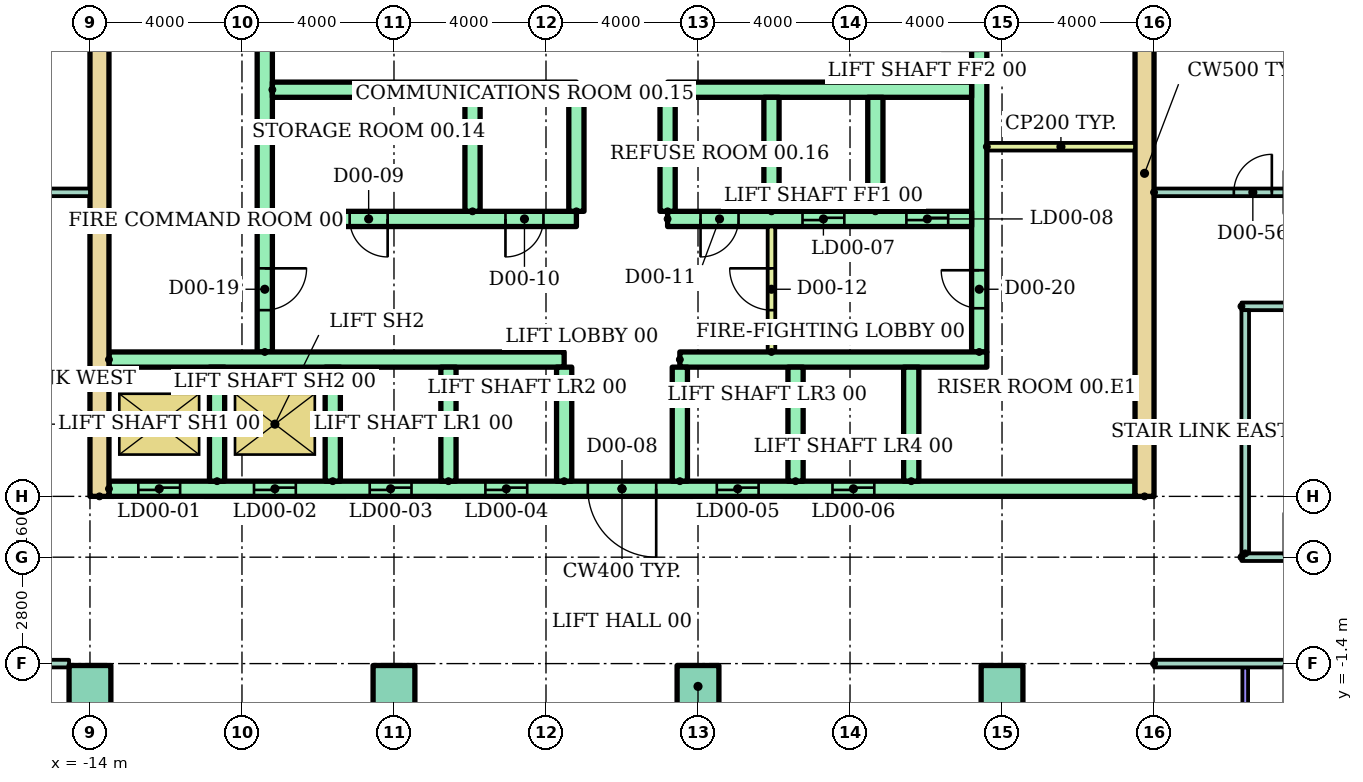
"""IFC4 building model, lengths in metres.
Left out: names, types, materials, properties, quantities, classifications, styles, units other than length and angle.
Written with IfcOpenShell. Run it as: python <this file> out.ifc"""

import sys

from ifc_helpers import new_model, si_unit, direction, frame, frame_2d, origin, origin_2d, place, context, subcontext, project, spatial, rectangle, extrude, element, fill, save


model = new_model("IFC4")
c1 = context("Model", 3, precision=1e-05, world=origin(), true_north=direction((0.0, 1.0)))
c2 = subcontext(c1, "Body", "Model", "MODEL_VIEW")
j1 = project(units=[si_unit("LENGTHUNIT", "METRE"), si_unit("PLANEANGLEUNIT", "RADIAN")], contexts=[c1])
p1 = place(None, origin())
s1 = spatial("IfcSite", under=j1, at=p1, CompositionType="ELEMENT")
p2 = place(p1, origin())
s2 = spatial("IfcBuilding", under=s1, at=p2, CompositionType="ELEMENT")
p3 = place(p2, origin())
s3 = spatial("IfcBuildingStorey", under=s2, at=p3, CompositionType="ELEMENT", Elevation=0.0)
for number, where in (
    (1, (-14.0, -2.0, 0.0)),
    (2, (-6.0, -2.0, 0.0)),
    (3, (2.0, -2.0, 0.0)),
    (4, (10.0, -2.0, 0.0)),
):
    element("IfcColumn", number, at=place(p3, frame(where)), inside=s3, PredefinedType="COLUMN", context=c2, shape_type="SweptSolid", body=[
        extrude(rectangle(XDim=1.1, YDim=1.1, at=origin_2d()), origin(), (0.0, 0.0, 1.0), 6.0),
    ])
for number, where, z_axis, x_axis in (
    (5, (-13.75, 3.0, 0.0), (0.0, 0.0, 1.0), (0.0, 1.0, 0.0)),
    (6, (13.75, 3.0, 0.0), (0.0, 0.0, 1.0), (0.0, 1.0, 0.0)),
):
    element("IfcWall", number, at=place(p3, frame(where, z_axis=z_axis, x_axis=x_axis)), inside=s3, PredefinedType="SHEAR", context=c2, shape_type="SweptSolid", body=[
        extrude(rectangle(XDim=17.0, YDim=0.5, at=frame_2d((8.5, 0.0))), origin(), (0.0, 0.0, 1.0), 5.7),
    ])
p4 = place(p3, frame((-9.4, 6.8, 0.0), z_axis=(0.0, 0.0, 1.0), x_axis=(0.0, 1.0, 0.0)))
e7 = element("IfcWall", 7, at=p4, inside=s3, PredefinedType="SHEAR", context=c2, shape_type="SweptSolid", body=[
    extrude(rectangle(XDim=12.7, YDim=0.4, at=frame_2d((6.35, 0.0))), origin(), (0.0, 0.0, 1.0), 5.7),
])
p5 = place(p4, frame((1.1, 0.0, 0.0)))
e8 = element("IfcOpeningElement", 8, at=p5, cuts=e7, PredefinedType="OPENING", context=c2, shape_type="SweptSolid", body=[
    extrude(rectangle(XDim=1.1, YDim=2.1, at=frame_2d((0.55, 1.05))), frame((0.0, 0.21, 0.0), z_axis=(0.0, -1.0, 0.0), x_axis=(1.0, 0.0, 0.0)), (0.0, 0.0, 1.0), 0.42),
])
p6 = place(p3, frame((9.4, 6.8, 0.0), z_axis=(0.0, 0.0, 1.0), x_axis=(0.0, 1.0, 0.0)))
e9 = element("IfcWall", 9, at=p6, inside=s3, PredefinedType="SHEAR", context=c2, shape_type="SweptSolid", body=[
    extrude(rectangle(XDim=12.7, YDim=0.4, at=frame_2d((6.35, 0.0))), origin(), (0.0, 0.0, 1.0), 5.7),
])
p7 = place(p6, frame((1.15, 0.0, 0.0)))
e10 = element("IfcOpeningElement", 10, at=p7, cuts=e9, PredefinedType="OPENING", context=c2, shape_type="SweptSolid", body=[
    extrude(rectangle(XDim=1.0, YDim=2.1, at=frame_2d((0.5, 1.05))), frame((0.0, 0.21, 0.0), z_axis=(0.0, -1.0, 0.0), x_axis=(1.0, 0.0, 0.0)), (0.0, 0.0, 1.0), 0.42),
])
p8 = place(p6, frame((7.925, 0.0, 0.0)))
e11 = element("IfcOpeningElement", 11, at=p8, cuts=e9, PredefinedType="OPENING", context=c2, shape_type="SweptSolid", body=[
    extrude(rectangle(XDim=1.0, YDim=2.1, at=frame_2d((0.5, 1.05))), frame((0.0, 0.21, 0.0), z_axis=(0.0, -1.0, 0.0), x_axis=(1.0, 0.0, 0.0)), (0.0, 0.0, 1.0), 0.42),
])
p9 = place(p3, frame((-13.5, 3.2, 0.0)))
e12 = element("IfcWall", 12, at=p9, inside=s3, PredefinedType="SHEAR", context=c2, shape_type="SweptSolid", body=[
    extrude(rectangle(XDim=27.0, YDim=0.4, at=frame_2d((13.5, 0.0))), origin(), (0.0, 0.0, 1.0), 5.7),
])
p10 = place(p9, frame((0.772, 0.0, 0.0)))
e13 = element("IfcOpeningElement", 13, at=p10, cuts=e12, PredefinedType="OPENING", context=c2, shape_type="SweptSolid", body=[
    extrude(rectangle(XDim=1.1, YDim=2.1, at=frame_2d((0.55, 1.05))), frame((0.0, 0.21, 0.0), z_axis=(0.0, -1.0, 0.0), x_axis=(1.0, 0.0, 0.0)), (0.0, 0.0, 1.0), 0.42),
])
p11 = place(p9, frame((3.817, 0.0, 0.0)))
e14 = element("IfcOpeningElement", 14, at=p11, cuts=e12, PredefinedType="OPENING", context=c2, shape_type="SweptSolid", body=[
    extrude(rectangle(XDim=1.1, YDim=2.1, at=frame_2d((0.55, 1.05))), frame((0.0, 0.21, 0.0), z_axis=(0.0, -1.0, 0.0), x_axis=(1.0, 0.0, 0.0)), (0.0, 0.0, 1.0), 0.42),
])
p12 = place(p9, frame((6.861, 0.0, 0.0)))
e15 = element("IfcOpeningElement", 15, at=p12, cuts=e12, PredefinedType="OPENING", context=c2, shape_type="SweptSolid", body=[
    extrude(rectangle(XDim=1.1, YDim=2.1, at=frame_2d((0.55, 1.05))), frame((0.0, 0.21, 0.0), z_axis=(0.0, -1.0, 0.0), x_axis=(1.0, 0.0, 0.0)), (0.0, 0.0, 1.0), 0.42),
])
p13 = place(p9, frame((9.906, 0.0, 0.0)))
e16 = element("IfcOpeningElement", 16, at=p13, cuts=e12, PredefinedType="OPENING", context=c2, shape_type="SweptSolid", body=[
    extrude(rectangle(XDim=1.1, YDim=2.1, at=frame_2d((0.55, 1.05))), frame((0.0, 0.21, 0.0), z_axis=(0.0, -1.0, 0.0), x_axis=(1.0, 0.0, 0.0)), (0.0, 0.0, 1.0), 0.42),
])
p14 = place(p9, frame((15.994, 0.0, 0.0)))
e17 = element("IfcOpeningElement", 17, at=p14, cuts=e12, PredefinedType="OPENING", context=c2, shape_type="SweptSolid", body=[
    extrude(rectangle(XDim=1.1, YDim=2.1, at=frame_2d((0.55, 1.05))), frame((0.0, 0.21, 0.0), z_axis=(0.0, -1.0, 0.0), x_axis=(1.0, 0.0, 0.0)), (0.0, 0.0, 1.0), 0.42),
])
p15 = place(p9, frame((19.039, 0.0, 0.0)))
e18 = element("IfcOpeningElement", 18, at=p15, cuts=e12, PredefinedType="OPENING", context=c2, shape_type="SweptSolid", body=[
    extrude(rectangle(XDim=1.1, YDim=2.1, at=frame_2d((0.55, 1.05))), frame((0.0, 0.21, 0.0), z_axis=(0.0, -1.0, 0.0), x_axis=(1.0, 0.0, 0.0)), (0.0, 0.0, 1.0), 0.42),
])
p16 = place(p9, frame((12.6, 0.0, 0.0)))
e19 = element("IfcOpeningElement", 19, at=p16, cuts=e12, PredefinedType="OPENING", context=c2, shape_type="SweptSolid", body=[
    extrude(rectangle(XDim=1.8, YDim=2.1, at=frame_2d((0.9, 1.05))), frame((0.0, 0.21, 0.0), z_axis=(0.0, -1.0, 0.0), x_axis=(1.0, 0.0, 0.0)), (0.0, 0.0, 1.0), 0.42),
])
p17 = place(p3, frame((-13.5, 6.6, 0.0)))
e20 = element("IfcWall", 20, at=p17, inside=s3, PredefinedType="SHEAR", context=c2, shape_type="SweptSolid", body=[
    extrude(rectangle(XDim=11.978, YDim=0.4, at=frame_2d((5.989, 0.0))), origin(), (0.0, 0.0, 1.0), 5.7),
])
p18 = place(p3, frame((1.522, 6.6, 0.0)))
e21 = element("IfcWall", 21, at=p18, inside=s3, PredefinedType="SHEAR", context=c2, shape_type="SweptSolid", body=[
    extrude(rectangle(XDim=8.078, YDim=0.4, at=frame_2d((4.039, 0.0))), origin(), (0.0, 0.0, 1.0), 5.7),
])
for number, where, z_axis, x_axis in (
    (22, (-10.656, 3.4, 0.0), (0.0, 0.0, 1.0), (0.0, 1.0, 0.0)),
    (23, (-7.611, 3.4, 0.0), (0.0, 0.0, 1.0), (0.0, 1.0, 0.0)),
    (24, (-4.567, 3.4, 0.0), (0.0, 0.0, 1.0), (0.0, 1.0, 0.0)),
    (25, (-1.522, 3.4, 0.0), (0.0, 0.0, 1.0), (0.0, 1.0, 0.0)),
    (26, (1.522, 3.4, 0.0), (0.0, 0.0, 1.0), (0.0, 1.0, 0.0)),
    (27, (4.567, 3.4, 0.0), (0.0, 0.0, 1.0), (0.0, 1.0, 0.0)),
    (28, (7.611, 3.4, 0.0), (0.0, 0.0, 1.0), (0.0, 1.0, 0.0)),
):
    element("IfcWall", number, at=place(p3, frame(where, z_axis=z_axis, x_axis=x_axis)), inside=s3, PredefinedType="SHEAR", context=c2, shape_type="SweptSolid", body=[
        extrude(rectangle(XDim=3.0, YDim=0.4, at=frame_2d((1.5, 0.0))), origin(), (0.0, 0.0, 1.0), 5.7),
    ])
p19 = place(p3, frame((-9.2, 10.3, 0.0)))
e29 = element("IfcWall", 29, at=p19, inside=s3, PredefinedType="SHEAR", context=c2, shape_type="SweptSolid", body=[
    extrude(rectangle(XDim=8.0, YDim=0.4, at=frame_2d((4.0, 0.0))), origin(), (0.0, 0.0, 1.0), 5.7),
])
p20 = place(p19, frame((2.033, 0.0, 0.0)))
e30 = element("IfcOpeningElement", 30, at=p20, cuts=e29, PredefinedType="OPENING", context=c2, shape_type="SweptSolid", body=[
    extrude(rectangle(XDim=1.0, YDim=2.1, at=frame_2d((0.5, 1.05))), frame((0.0, 0.21, 0.0), z_axis=(0.0, -1.0, 0.0), x_axis=(1.0, 0.0, 0.0)), (0.0, 0.0, 1.0), 0.42),
])
p21 = place(p19, frame((6.133, 0.0, 0.0)))
e31 = element("IfcOpeningElement", 31, at=p21, cuts=e29, PredefinedType="OPENING", context=c2, shape_type="SweptSolid", body=[
    extrude(rectangle(XDim=1.0, YDim=2.1, at=frame_2d((0.5, 1.05))), frame((0.0, 0.21, 0.0), z_axis=(0.0, -1.0, 0.0), x_axis=(1.0, 0.0, 0.0)), (0.0, 0.0, 1.0), 0.42),
])
p22 = place(p3, frame((-9.2, 13.7, 0.0)))
e32 = element("IfcWall", 32, at=p22, inside=s3, PredefinedType="SHEAR", context=c2, shape_type="SweptSolid", body=[
    extrude(rectangle(XDim=8.0, YDim=0.4, at=frame_2d((4.0, 0.0))), origin(), (0.0, 0.0, 1.0), 5.7),
])
p23 = place(p3, frame((1.2, 10.3, 0.0)))
e33 = element("IfcWall", 33, at=p23, inside=s3, PredefinedType="SHEAR", context=c2, shape_type="SweptSolid", body=[
    extrude(rectangle(XDim=8.0, YDim=0.4, at=frame_2d((4.0, 0.0))), origin(), (0.0, 0.0, 1.0), 5.7),
])
p24 = place(p23, frame((3.55, 0.0, 0.0)))
e34 = element("IfcOpeningElement", 34, at=p24, cuts=e33, PredefinedType="OPENING", context=c2, shape_type="SweptSolid", body=[
    extrude(rectangle(XDim=1.1, YDim=2.1, at=frame_2d((0.55, 1.05))), frame((0.0, 0.21, 0.0), z_axis=(0.0, -1.0, 0.0), x_axis=(1.0, 0.0, 0.0)), (0.0, 0.0, 1.0), 0.42),
])
p25 = place(p23, frame((6.283, 0.0, 0.0)))
e35 = element("IfcOpeningElement", 35, at=p25, cuts=e33, PredefinedType="OPENING", context=c2, shape_type="SweptSolid", body=[
    extrude(rectangle(XDim=1.1, YDim=2.1, at=frame_2d((0.55, 1.05))), frame((0.0, 0.21, 0.0), z_axis=(0.0, -1.0, 0.0), x_axis=(1.0, 0.0, 0.0)), (0.0, 0.0, 1.0), 0.42),
])
p26 = place(p23, frame((0.867, 0.0, 0.0)))
e36 = element("IfcOpeningElement", 36, at=p26, cuts=e33, PredefinedType="OPENING", context=c2, shape_type="SweptSolid", body=[
    extrude(rectangle(XDim=1.0, YDim=2.1, at=frame_2d((0.5, 1.05))), frame((0.0, 0.21, 0.0), z_axis=(0.0, -1.0, 0.0), x_axis=(1.0, 0.0, 0.0)), (0.0, 0.0, 1.0), 0.42),
])
p27 = place(p3, frame((1.2, 13.7, 0.0)))
e37 = element("IfcWall", 37, at=p27, inside=s3, PredefinedType="SHEAR", context=c2, shape_type="SweptSolid", body=[
    extrude(rectangle(XDim=8.0, YDim=0.4, at=frame_2d((4.0, 0.0))), origin(), (0.0, 0.0, 1.0), 5.7),
])
for number, where, z_axis, x_axis in (
    (38, (-3.933, 10.5, 0.0), (0.0, 0.0, 1.0), (0.0, 1.0, 0.0)),
    (39, (-1.2, 10.5, 0.0), (0.0, 0.0, 1.0), (0.0, 1.0, 0.0)),
    (40, (1.2, 10.5, 0.0), (0.0, 0.0, 1.0), (0.0, 1.0, 0.0)),
    (41, (3.933, 10.5, 0.0), (0.0, 0.0, 1.0), (0.0, 1.0, 0.0)),
    (42, (6.667, 10.5, 0.0), (0.0, 0.0, 1.0), (0.0, 1.0, 0.0)),
):
    element("IfcWall", number, at=place(p3, frame(where, z_axis=z_axis, x_axis=x_axis)), inside=s3, PredefinedType="SHEAR", context=c2, shape_type="SweptSolid", body=[
        extrude(rectangle(XDim=3.0, YDim=0.4, at=frame_2d((1.5, 0.0))), origin(), (0.0, 0.0, 1.0), 5.7),
    ])
p28 = place(p3, frame((3.933, 6.8, 0.0), z_axis=(0.0, 0.0, 1.0), x_axis=(0.0, 1.0, 0.0)))
e43 = element("IfcWall", 43, at=p28, inside=s3, PredefinedType="PARTITIONING", context=c2, shape_type="SweptSolid", body=[
    extrude(rectangle(XDim=3.3, YDim=0.2, at=frame_2d((1.65, 0.0))), origin(), (0.0, 0.0, 1.0), 5.7),
])
p29 = place(p28, frame((1.1, 0.0, 0.0)))
e44 = element("IfcOpeningElement", 44, at=p29, cuts=e43, PredefinedType="OPENING", context=c2, shape_type="SweptSolid", body=[
    extrude(rectangle(XDim=1.1, YDim=2.1, at=frame_2d((0.55, 1.05))), frame((0.0, 0.11, 0.0), z_axis=(0.0, -1.0, 0.0), x_axis=(1.0, 0.0, 0.0)), (0.0, 0.0, 1.0), 0.22),
])
p30 = place(p3, frame((9.6, 12.2, 0.0)))
e45 = element("IfcWall", 45, at=p30, inside=s3, PredefinedType="PARTITIONING", context=c2, shape_type="SweptSolid", body=[
    extrude(rectangle(XDim=3.9, YDim=0.2, at=frame_2d((1.95, 0.0))), origin(), (0.0, 0.0, 1.0), 5.7),
])
p31 = place(p3, frame((-21.45, -1.4, 0.0)))
e46 = element("IfcWall", 46, at=p31, inside=s3, PredefinedType="PARTITIONING", context=c2, shape_type="SweptSolid", body=[
    extrude(rectangle(XDim=6.9, YDim=0.2, at=frame_2d((3.45, 0.0))), origin(), (0.0, 0.0, 1.0), 5.7),
])
p32 = place(p3, frame((14.0, -1.4, 0.0)))
e47 = element("IfcWall", 47, at=p32, inside=s3, PredefinedType="PARTITIONING", context=c2, shape_type="SweptSolid", body=[
    extrude(rectangle(XDim=3.45, YDim=0.2, at=frame_2d((1.725, 0.0))), origin(), (0.0, 0.0, 1.0), 5.7),
])
p33 = place(p3, frame((16.3, 1.4, 0.0)))
e48 = element("IfcWall", 48, at=p33, inside=s3, PredefinedType="PARTITIONING", context=c2, shape_type="SweptSolid", body=[
    extrude(rectangle(XDim=1.15, YDim=0.2, at=frame_2d((0.575, 0.0))), origin(), (0.0, 0.0, 1.0), 5.7),
])
p34 = place(p3, frame((16.3, 8.0, 0.0)))
e49 = element("IfcWall", 49, at=p34, inside=s3, PredefinedType="PARTITIONING", context=c2, shape_type="SweptSolid", body=[
    extrude(rectangle(XDim=21.2, YDim=0.2, at=frame_2d((10.6, 0.0))), origin(), (0.0, 0.0, 1.0), 5.7),
])
p35 = place(p3, frame((-21.45, 11.0, 0.0)))
e50 = element("IfcWall", 50, at=p35, inside=s3, PredefinedType="PARTITIONING", context=c2, shape_type="SweptSolid", body=[
    extrude(rectangle(XDim=7.45, YDim=0.2, at=frame_2d((3.725, 0.0))), origin(), (0.0, 0.0, 1.0), 5.7),
])
p36 = place(p35, frame((0.35, 0.0, 0.0)))
e51 = element("IfcOpeningElement", 51, at=p36, cuts=e50, PredefinedType="OPENING", context=c2, shape_type="SweptSolid", body=[
    extrude(rectangle(XDim=0.9, YDim=2.1, at=frame_2d((0.45, 1.05))), frame((0.0, 0.11, 0.0), z_axis=(0.0, -1.0, 0.0), x_axis=(1.0, 0.0, 0.0)), (0.0, 0.0, 1.0), 0.22),
])
p37 = place(p35, frame((4.45, 0.0, 0.0)))
e52 = element("IfcOpeningElement", 52, at=p37, cuts=e50, PredefinedType="OPENING", context=c2, shape_type="SweptSolid", body=[
    extrude(rectangle(XDim=1.0, YDim=2.1, at=frame_2d((0.5, 1.05))), frame((0.0, 0.11, 0.0), z_axis=(0.0, -1.0, 0.0), x_axis=(1.0, 0.0, 0.0)), (0.0, 0.0, 1.0), 0.22),
])
p38 = place(p3, frame((14.0, 11.0, 0.0)))
e53 = element("IfcWall", 53, at=p38, inside=s3, PredefinedType="PARTITIONING", context=c2, shape_type="SweptSolid", body=[
    extrude(rectangle(XDim=3.45, YDim=0.2, at=frame_2d((1.725, 0.0))), origin(), (0.0, 0.0, 1.0), 5.7),
])
p39 = place(p38, frame((2.1, 0.0, 0.0)))
e54 = element("IfcOpeningElement", 54, at=p39, cuts=e53, PredefinedType="OPENING", context=c2, shape_type="SweptSolid", body=[
    extrude(rectangle(XDim=1.0, YDim=2.1, at=frame_2d((0.5, 1.05))), frame((0.0, 0.11, 0.0), z_axis=(0.0, -1.0, 0.0), x_axis=(1.0, 0.0, 0.0)), (0.0, 0.0, 1.0), 0.22),
])
p40 = place(p3, frame((16.4, 1.5, 0.0), z_axis=(0.0, 0.0, 1.0), x_axis=(0.0, 1.0, 0.0)))
e55 = element("IfcWall", 55, at=p40, inside=s3, PredefinedType="PARTITIONING", context=c2, shape_type="SweptSolid", body=[
    extrude(rectangle(XDim=6.4, YDim=0.2, at=frame_2d((3.2, 0.0))), origin(), (0.0, 0.0, 1.0), 5.7),
])
p41 = place(p3, frame((16.4, -19.5, 0.0), z_axis=(0.0, 0.0, 1.0), x_axis=(0.0, 1.0, 0.0)))
e56 = element("IfcWall", 56, at=p41, inside=s3, PredefinedType="PARTITIONING", context=c2, shape_type="SweptSolid", body=[
    extrude(rectangle(XDim=18.0, YDim=0.15, at=frame_2d((9.0, 0.0))), origin(), (0.0, 0.0, 1.0), 5.7),
])
p42 = place(p10, origin())
e57 = element("IfcDoor", 57, at=p42, inside=s3, OperationType="SLIDING_TO_LEFT", PredefinedType="DOOR", context=c2, shape_type="SweptSolid", body=[
    extrude(rectangle(XDim=1.1, YDim=2.1, at=frame_2d((0.55, 1.05))), frame((0.0, 0.025, 0.0), z_axis=(0.0, -1.0, 0.0), x_axis=(1.0, 0.0, 0.0)), (0.0, 0.0, 1.0), 0.05),
])
fill(e13, e57)
p43 = place(p11, origin())
e58 = element("IfcDoor", 58, at=p43, inside=s3, OperationType="SLIDING_TO_LEFT", PredefinedType="DOOR", context=c2, shape_type="SweptSolid", body=[
    extrude(rectangle(XDim=1.1, YDim=2.1, at=frame_2d((0.55, 1.05))), frame((0.0, 0.025, 0.0), z_axis=(0.0, -1.0, 0.0), x_axis=(1.0, 0.0, 0.0)), (0.0, 0.0, 1.0), 0.05),
])
fill(e14, e58)
p44 = place(p12, origin())
e59 = element("IfcDoor", 59, at=p44, inside=s3, OperationType="SLIDING_TO_LEFT", PredefinedType="DOOR", context=c2, shape_type="SweptSolid", body=[
    extrude(rectangle(XDim=1.1, YDim=2.1, at=frame_2d((0.55, 1.05))), frame((0.0, 0.025, 0.0), z_axis=(0.0, -1.0, 0.0), x_axis=(1.0, 0.0, 0.0)), (0.0, 0.0, 1.0), 0.05),
])
fill(e15, e59)
p45 = place(p13, origin())
e60 = element("IfcDoor", 60, at=p45, inside=s3, OperationType="SLIDING_TO_LEFT", PredefinedType="DOOR", context=c2, shape_type="SweptSolid", body=[
    extrude(rectangle(XDim=1.1, YDim=2.1, at=frame_2d((0.55, 1.05))), frame((0.0, 0.025, 0.0), z_axis=(0.0, -1.0, 0.0), x_axis=(1.0, 0.0, 0.0)), (0.0, 0.0, 1.0), 0.05),
])
fill(e16, e60)
p46 = place(p14, origin())
e61 = element("IfcDoor", 61, at=p46, inside=s3, OperationType="SLIDING_TO_LEFT", PredefinedType="DOOR", context=c2, shape_type="SweptSolid", body=[
    extrude(rectangle(XDim=1.1, YDim=2.1, at=frame_2d((0.55, 1.05))), frame((0.0, 0.025, 0.0), z_axis=(0.0, -1.0, 0.0), x_axis=(1.0, 0.0, 0.0)), (0.0, 0.0, 1.0), 0.05),
])
fill(e17, e61)
p47 = place(p15, origin())
e62 = element("IfcDoor", 62, at=p47, inside=s3, OperationType="SLIDING_TO_LEFT", PredefinedType="DOOR", context=c2, shape_type="SweptSolid", body=[
    extrude(rectangle(XDim=1.1, YDim=2.1, at=frame_2d((0.55, 1.05))), frame((0.0, 0.025, 0.0), z_axis=(0.0, -1.0, 0.0), x_axis=(1.0, 0.0, 0.0)), (0.0, 0.0, 1.0), 0.05),
])
fill(e18, e62)
p48 = place(p16, frame((1.8, 0.0, 0.0), z_axis=(0.0, 0.0, 1.0), x_axis=(-1.0, 0.0, 0.0)))
e63 = element("IfcDoor", 63, at=p48, inside=s3, OperationType="DOUBLE_DOOR_SINGLE_SWING", PredefinedType="DOOR", context=c2, shape_type="SweptSolid", body=[
    extrude(rectangle(XDim=1.8, YDim=2.1, at=frame_2d((0.9, 1.05))), frame((0.0, 0.025, 0.0), z_axis=(0.0, -1.0, 0.0), x_axis=(1.0, 0.0, 0.0)), (0.0, 0.0, 1.0), 0.05),
])
fill(e19, e63)
p49 = place(p24, origin())
e64 = element("IfcDoor", 64, at=p49, inside=s3, OperationType="SLIDING_TO_LEFT", PredefinedType="DOOR", context=c2, shape_type="SweptSolid", body=[
    extrude(rectangle(XDim=1.1, YDim=2.1, at=frame_2d((0.55, 1.05))), frame((0.0, 0.025, 0.0), z_axis=(0.0, -1.0, 0.0), x_axis=(1.0, 0.0, 0.0)), (0.0, 0.0, 1.0), 0.05),
])
fill(e34, e64)
p50 = place(p25, origin())
e65 = element("IfcDoor", 65, at=p50, inside=s3, OperationType="SLIDING_TO_LEFT", PredefinedType="DOOR", context=c2, shape_type="SweptSolid", body=[
    extrude(rectangle(XDim=1.1, YDim=2.1, at=frame_2d((0.55, 1.05))), frame((0.0, 0.025, 0.0), z_axis=(0.0, -1.0, 0.0), x_axis=(1.0, 0.0, 0.0)), (0.0, 0.0, 1.0), 0.05),
])
fill(e35, e65)
p51 = place(p20, frame((1.0, 0.0, 0.0), z_axis=(0.0, 0.0, 1.0), x_axis=(-1.0, 0.0, 0.0)))
e66 = element("IfcDoor", 66, at=p51, inside=s3, OperationType="SINGLE_SWING_RIGHT", PredefinedType="DOOR", context=c2, shape_type="SweptSolid", body=[
    extrude(rectangle(XDim=1.0, YDim=2.1, at=frame_2d((0.5, 1.05))), frame((0.0, 0.025, 0.0), z_axis=(0.0, -1.0, 0.0), x_axis=(1.0, 0.0, 0.0)), (0.0, 0.0, 1.0), 0.05),
])
fill(e30, e66)
p52 = place(p21, frame((1.0, 0.0, 0.0), z_axis=(0.0, 0.0, 1.0), x_axis=(-1.0, 0.0, 0.0)))
e67 = element("IfcDoor", 67, at=p52, inside=s3, OperationType="SINGLE_SWING_LEFT", PredefinedType="DOOR", context=c2, shape_type="SweptSolid", body=[
    extrude(rectangle(XDim=1.0, YDim=2.1, at=frame_2d((0.5, 1.05))), frame((0.0, 0.025, 0.0), z_axis=(0.0, -1.0, 0.0), x_axis=(1.0, 0.0, 0.0)), (0.0, 0.0, 1.0), 0.05),
])
fill(e31, e67)
p53 = place(p26, frame((1.0, 0.0, 0.0), z_axis=(0.0, 0.0, 1.0), x_axis=(-1.0, 0.0, 0.0)))
e68 = element("IfcDoor", 68, at=p53, inside=s3, OperationType="SINGLE_SWING_LEFT", PredefinedType="DOOR", context=c2, shape_type="SweptSolid", body=[
    extrude(rectangle(XDim=1.0, YDim=2.1, at=frame_2d((0.5, 1.05))), frame((0.0, 0.025, 0.0), z_axis=(0.0, -1.0, 0.0), x_axis=(1.0, 0.0, 0.0)), (0.0, 0.0, 1.0), 0.05),
])
fill(e36, e68)
p54 = place(p29, origin())
e69 = element("IfcDoor", 69, at=p54, inside=s3, OperationType="SINGLE_SWING_RIGHT", PredefinedType="DOOR", context=c2, shape_type="SweptSolid", body=[
    extrude(rectangle(XDim=1.1, YDim=2.1, at=frame_2d((0.55, 1.05))), frame((0.0, 0.025, 0.0), z_axis=(0.0, -1.0, 0.0), x_axis=(1.0, 0.0, 0.0)), (0.0, 0.0, 1.0), 0.05),
])
fill(e44, e69)
p55 = place(p5, frame((1.1, 0.0, 0.0), z_axis=(0.0, 0.0, 1.0), x_axis=(-1.0, 0.0, 0.0)))
e70 = element("IfcDoor", 70, at=p55, inside=s3, OperationType="SINGLE_SWING_RIGHT", PredefinedType="DOOR", context=c2, shape_type="SweptSolid", body=[
    extrude(rectangle(XDim=1.1, YDim=2.1, at=frame_2d((0.55, 1.05))), frame((0.0, 0.025, 0.0), z_axis=(0.0, -1.0, 0.0), x_axis=(1.0, 0.0, 0.0)), (0.0, 0.0, 1.0), 0.05),
])
fill(e8, e70)
p56 = place(p7, origin())
e71 = element("IfcDoor", 71, at=p56, inside=s3, OperationType="SINGLE_SWING_RIGHT", PredefinedType="DOOR", context=c2, shape_type="SweptSolid", body=[
    extrude(rectangle(XDim=1.0, YDim=2.1, at=frame_2d((0.5, 1.05))), frame((0.0, 0.025, 0.0), z_axis=(0.0, -1.0, 0.0), x_axis=(1.0, 0.0, 0.0)), (0.0, 0.0, 1.0), 0.05),
])
fill(e10, e71)
p57 = place(p39, origin())
e72 = element("IfcDoor", 72, at=p57, inside=s3, OperationType="SINGLE_SWING_RIGHT", PredefinedType="DOOR", context=c2, shape_type="SweptSolid", body=[
    extrude(rectangle(XDim=1.0, YDim=2.1, at=frame_2d((0.5, 1.05))), frame((0.0, 0.025, 0.0), z_axis=(0.0, -1.0, 0.0), x_axis=(1.0, 0.0, 0.0)), (0.0, 0.0, 1.0), 0.05),
])
fill(e54, e72)
save(model, sys.argv[1])
